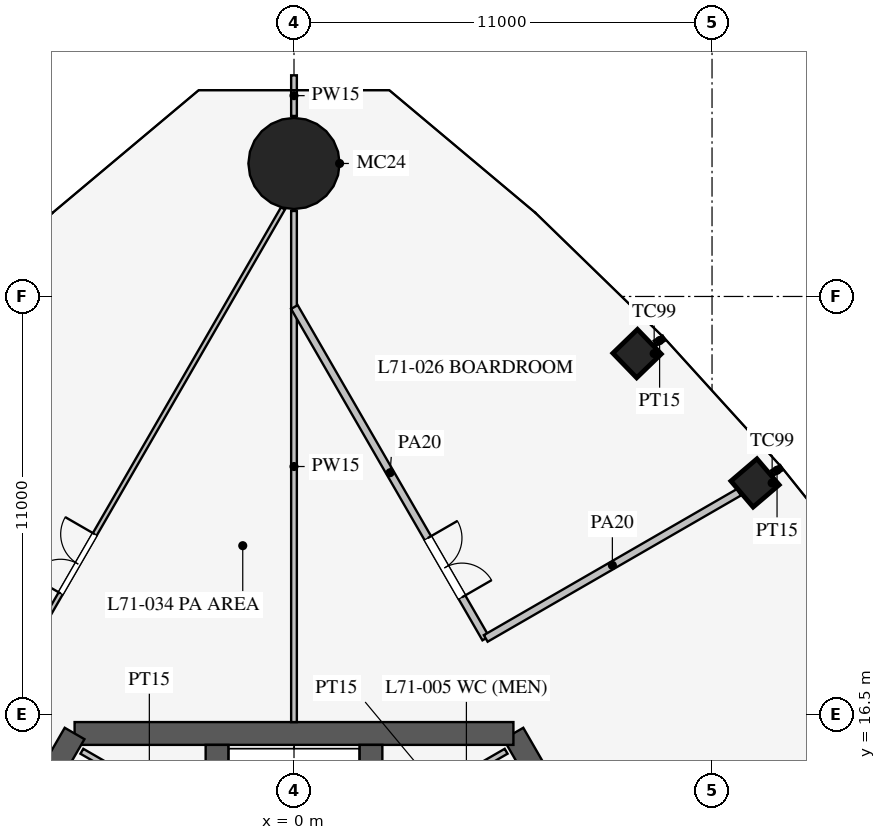
"""IFC4 building model, lengths in metres.
Left out: names, types, materials, properties, quantities, classifications, styles, units other than length and angle.
Written with IfcOpenShell. Run it as: python <this file> out.ifc"""

import sys

from ifc_helpers import new_model, si_unit, direction, frame, frame_2d, origin, origin_2d, place, context, subcontext, project, spatial, rectangle, circle, extrude, element, fill, save


model = new_model("IFC4")
c1 = context("Model", 3, precision=1e-05, world=origin(), true_north=direction((0.0, 1.0)))
c2 = subcontext(c1, "Body", "Model", "MODEL_VIEW")
j1 = project(units=[si_unit("LENGTHUNIT", "METRE"), si_unit("PLANEANGLEUNIT", "RADIAN")], contexts=[c1])
p1 = place(None, origin())
s1 = spatial("IfcSite", under=j1, at=p1, CompositionType="ELEMENT")
p2 = place(p1, origin())
s2 = spatial("IfcBuilding", under=s1, at=p2, CompositionType="ELEMENT")
p3 = place(p2, frame((0.0, 0.0, 309.9)))
s3 = spatial("IfcBuildingStorey", under=s2, at=p3, CompositionType="ELEMENT", Elevation=309.9)
for number, where, z_axis, x_axis in (
    (1, (12.132, 22.593, 0.0), (0.0, 0.0, 1.0), (-0.649, 0.761, 0.0)),
    (2, (9.027, 25.997, 0.0), (0.0, 0.0, 1.0), (-0.695, 0.719, 0.0)),
):
    element("IfcColumn", number, at=place(p3, frame(where, z_axis=z_axis, x_axis=x_axis)), inside=s3, PredefinedType="COLUMN", context=c2, shape_type="SweptSolid", body=[
        extrude(rectangle(XDim=0.9, YDim=0.9, at=origin_2d()), origin(), (0.0, 0.0, 1.0), 4.2),
    ])
p4 = place(p3, frame((0.0, 31.0, 0.0), z_axis=(0.0, 0.0, 1.0), x_axis=(1.0, 0.0, 0.0)))
e3 = element("IfcColumn", 3, at=p4, inside=s3, PredefinedType="COLUMN", context=c2, shape_type="SweptSolid", body=[
    extrude(circle(Radius=1.2, at=origin_2d()), origin(), (0.0, 0.0, 1.0), 4.2),
])
p5 = place(p3, frame((16.743, -3.0, 0.0), z_axis=(0.0, 0.0, 1.0), x_axis=(-0.500002442456, 0.866023993627, 0.0)))
e4 = element("IfcWall", 4, at=p5, inside=s3, PredefinedType="SHEAR", context=c2, shape_type="SweptSolid", body=[
    extrude(rectangle(XDim=21.939, YDim=0.6, at=frame_2d((10.97, 0.0))), origin(), (0.0, 0.0, 1.0), 4.2),
])
p6 = place(p5, frame((17.27, 0.0, 0.0)))
e5 = element("IfcOpeningElement", 5, at=p6, cuts=e4, PredefinedType="OPENING", context=c2, shape_type="SweptSolid", body=[
    extrude(rectangle(XDim=1.2, YDim=2.1, at=frame_2d((0.6, 1.05))), frame((0.0, 0.31, 0.0), z_axis=(0.0, -1.0, 0.0), x_axis=(1.0, 0.0, 0.0)), (0.0, 0.0, 1.0), 0.62),
])
p7 = place(p5, frame((3.47, 0.0, 0.0)))
e6 = element("IfcOpeningElement", 6, at=p7, cuts=e4, PredefinedType="OPENING", context=c2, shape_type="SweptSolid", body=[
    extrude(rectangle(XDim=1.2, YDim=2.1, at=frame_2d((0.6, 1.05))), frame((0.0, 0.31, 0.0), z_axis=(0.0, -1.0, 0.0), x_axis=(1.0, 0.0, 0.0)), (0.0, 0.0, 1.0), 0.62),
])
p8 = place(p3, frame((5.773, 16.0, 0.0), z_axis=(0.0, 0.0, 1.0), x_axis=(-1.0, 0.0, 0.0)))
e7 = element("IfcWall", 7, at=p8, inside=s3, PredefinedType="SHEAR", context=c2, shape_type="SweptSolid", body=[
    extrude(rectangle(XDim=11.547, YDim=0.6, at=frame_2d((5.773, 0.0))), origin(), (0.0, 0.0, 1.0), 4.2),
])
p9 = place(p3, frame((-5.773, 16.0, 0.0), z_axis=(0.0, 0.0, 1.0), x_axis=(-0.500002442456, -0.866023993627, 0.0)))
e8 = element("IfcWall", 8, at=p9, inside=s3, PredefinedType="SHEAR", context=c2, shape_type="SweptSolid", body=[
    extrude(rectangle(XDim=21.939, YDim=0.6, at=frame_2d((10.97, 0.0))), origin(), (0.0, 0.0, 1.0), 4.2),
])
p10 = place(p9, frame((17.27, 0.0, 0.0)))
e9 = element("IfcOpeningElement", 9, at=p10, cuts=e8, PredefinedType="OPENING", context=c2, shape_type="SweptSolid", body=[
    extrude(rectangle(XDim=1.2, YDim=2.1, at=frame_2d((0.6, 1.05))), frame((0.0, 0.31, 0.0), z_axis=(0.0, -1.0, 0.0), x_axis=(1.0, 0.0, 0.0)), (0.0, 0.0, 1.0), 0.62),
])
p11 = place(p9, frame((3.47, 0.0, 0.0)))
e10 = element("IfcOpeningElement", 10, at=p11, cuts=e8, PredefinedType="OPENING", context=c2, shape_type="SweptSolid", body=[
    extrude(rectangle(XDim=1.2, YDim=2.1, at=frame_2d((0.6, 1.05))), frame((0.0, 0.31, 0.0), z_axis=(0.0, -1.0, 0.0), x_axis=(1.0, 0.0, 0.0)), (0.0, 0.0, 1.0), 0.62),
])
for number, where, z_axis, x_axis in (
    (11, (2.025, 6.525, 0.0), (0.0, 0.0, 1.0), (0.0, 1.0, 0.0)),
    (12, (-2.025, 6.525, 0.0), (0.0, 0.0, 1.0), (0.0, 1.0, 0.0)),
):
    element("IfcWall", number, at=place(p3, frame(where, z_axis=z_axis, x_axis=x_axis)), inside=s3, PredefinedType="SHEAR", context=c2, shape_type="SweptSolid", body=[
        extrude(rectangle(XDim=9.175, YDim=0.6, at=frame_2d((4.587, 0.0))), origin(), (0.0, 0.0, 1.0), 4.2),
    ])
for number, where, z_axis, x_axis in (
    (13, (2.031, 13.482, 0.0), (0.0, 0.0, 1.0), (0.866, 0.5, 0.0)),
    (14, (-2.031, 13.482, 0.0), (0.0, 0.0, 1.0), (-0.866, 0.5, 0.0)),
):
    element("IfcWall", number, at=place(p3, frame(where, z_axis=z_axis, x_axis=x_axis)), inside=s3, PredefinedType="PARTITIONING", context=c2, shape_type="SweptSolid", body=[
        extrude(rectangle(XDim=4.1, YDim=0.15, at=frame_2d((2.05, 0.0))), origin(), (0.0, 0.0, 1.0), 4.0),
    ])
p12 = place(p3, frame((0.0, 16.3, 0.0), z_axis=(0.0, 0.0, 1.0), x_axis=(0.0, 1.0, 0.0)))
e15 = element("IfcWall", 15, at=p12, inside=s3, PredefinedType="PARTITIONING", context=c2, shape_type="SweptSolid", body=[
    extrude(rectangle(XDim=13.45, YDim=0.15, at=frame_2d((6.725, 0.0))), origin(), (0.0, 0.0, 1.0), 2.5),
])
p13 = place(p3, frame((0.0, 32.25, 0.0), z_axis=(0.0, 0.0, 1.0), x_axis=(0.0, 1.0, 0.0)))
e16 = element("IfcWall", 16, at=p13, inside=s3, PredefinedType="PARTITIONING", context=c2, shape_type="SweptSolid", body=[
    extrude(rectangle(XDim=1.07, YDim=0.15, at=frame_2d((0.535, 0.0))), origin(), (0.0, 0.0, 1.0), 2.5),
])
p14 = place(p3, frame((5.045, 18.501, 0.0), z_axis=(0.0, 0.0, 1.0), x_axis=(-0.499990381663, 0.866030956863, 0.0)))
e17 = element("IfcWall", 17, at=p14, inside=s3, PredefinedType="PARTITIONING", context=c2, shape_type="SweptSolid", body=[
    extrude(rectangle(XDim=10.07, YDim=0.2, at=frame_2d((5.035, 0.0))), origin(), (0.0, 0.0, 1.0), 2.9),
])
p15 = place(p14, frame((1.25, 0.0, 0.15)))
e18 = element("IfcOpeningElement", 18, at=p15, cuts=e17, PredefinedType="OPENING", context=c2, shape_type="SweptSolid", body=[
    extrude(rectangle(XDim=1.8, YDim=2.1, at=frame_2d((0.9, 1.05))), frame((0.0, 0.11, 0.0), z_axis=(0.0, -1.0, 0.0), x_axis=(1.0, 0.0, 0.0)), (0.0, 0.0, 1.0), 0.22),
])
p16 = place(p3, frame((12.589, 22.857, 0.0), z_axis=(0.0, 0.0, 1.0), x_axis=(0.865982457891, 0.500074377092, 0.0)))
e19 = element("IfcWall", 19, at=p16, inside=s3, PredefinedType="PARTITIONING", context=c2, shape_type="SweptSolid", body=[
    extrude(rectangle(XDim=0.28, YDim=0.15, at=frame_2d((0.14, 0.0))), origin(), (0.0, 0.0, 1.0), 2.9),
])
p17 = place(p3, frame((9.504, 26.271, 0.0), z_axis=(0.0, 0.0, 1.0), x_axis=(0.866004557827, 0.500036104519, 0.0)))
e20 = element("IfcWall", 20, at=p17, inside=s3, PredefinedType="PARTITIONING", context=c2, shape_type="SweptSolid", body=[
    extrude(rectangle(XDim=0.27, YDim=0.15, at=frame_2d((0.135, 0.0))), origin(), (0.0, 0.0, 1.0), 2.9),
])
p18 = place(p3, frame((5.045, 18.501, 0.0), z_axis=(0.0, 0.0, 1.0), x_axis=(0.866043990756, 0.499967805039, 0.0)))
e21 = element("IfcWall", 21, at=p18, inside=s3, PredefinedType="PARTITIONING", context=c2, shape_type="SweptSolid", body=[
    extrude(rectangle(XDim=7.695, YDim=0.2, at=frame_2d((3.847, 0.0))), origin(), (0.0, 0.0, 1.0), 2.9),
])
p19 = place(p3, frame((-0.29, 29.818, 0.0), z_axis=(0.0, 0.0, 1.0), x_axis=(-0.500000361757, -0.866025194924, 0.0)))
e22 = element("IfcWall", 22, at=p19, inside=s3, PredefinedType="PARTITIONING", context=c2, shape_type="SweptSolid", body=[
    extrude(rectangle(XDim=51.355, YDim=0.12, at=frame_2d((25.678, 0.0))), origin(), (0.0, 0.0, 1.0), 2.9),
])
p20 = place(p19, frame((9.9, 0.0, 0.15)))
e23 = element("IfcOpeningElement", 23, at=p20, cuts=e22, PredefinedType="OPENING", context=c2, shape_type="SweptSolid", body=[
    extrude(rectangle(XDim=1.8, YDim=2.1, at=frame_2d((0.9, 1.05))), frame((0.0, 0.07, 0.0), z_axis=(0.0, -1.0, 0.0), x_axis=(1.0, 0.0, 0.0)), (0.0, 0.0, 1.0), 0.14),
])
p21 = place(p19, frame((39.65, 0.0, 0.15)))
e24 = element("IfcOpeningElement", 24, at=p21, cuts=e22, PredefinedType="OPENING", context=c2, shape_type="SweptSolid", body=[
    extrude(rectangle(XDim=1.8, YDim=2.1, at=frame_2d((0.9, 1.05))), frame((0.0, 0.07, 0.0), z_axis=(0.0, -1.0, 0.0), x_axis=(1.0, 0.0, 0.0)), (0.0, 0.0, 1.0), 0.14),
])
p22 = place(p15, frame((1.8, 0.0, 0.0), z_axis=(0.0, 0.0, 1.0), x_axis=(-1.0, 0.0, 0.0)))
e25 = element("IfcDoor", 25, at=p22, inside=s3, OperationType="DOUBLE_DOOR_SINGLE_SWING", PredefinedType="DOOR", context=c2, shape_type="SweptSolid", body=[
    extrude(rectangle(XDim=1.8, YDim=2.1, at=frame_2d((0.9, 1.05))), frame((0.0, 0.025, 0.0), z_axis=(0.0, -1.0, 0.0), x_axis=(1.0, 0.0, 0.0)), (0.0, 0.0, 1.0), 0.05),
])
fill(e18, e25)
p23 = place(p20, frame((1.8, 0.0, 0.0), z_axis=(0.0, 0.0, 1.0), x_axis=(-1.0, 0.0, 0.0)))
e26 = element("IfcDoor", 26, at=p23, inside=s3, OperationType="DOUBLE_DOOR_SINGLE_SWING", PredefinedType="DOOR", context=c2, shape_type="SweptSolid", body=[
    extrude(rectangle(XDim=1.8, YDim=2.1, at=frame_2d((0.9, 1.05))), frame((0.0, 0.025, 0.0), z_axis=(0.0, -1.0, 0.0), x_axis=(1.0, 0.0, 0.0)), (0.0, 0.0, 1.0), 0.05),
])
fill(e23, e26)
save(model, sys.argv[1])
